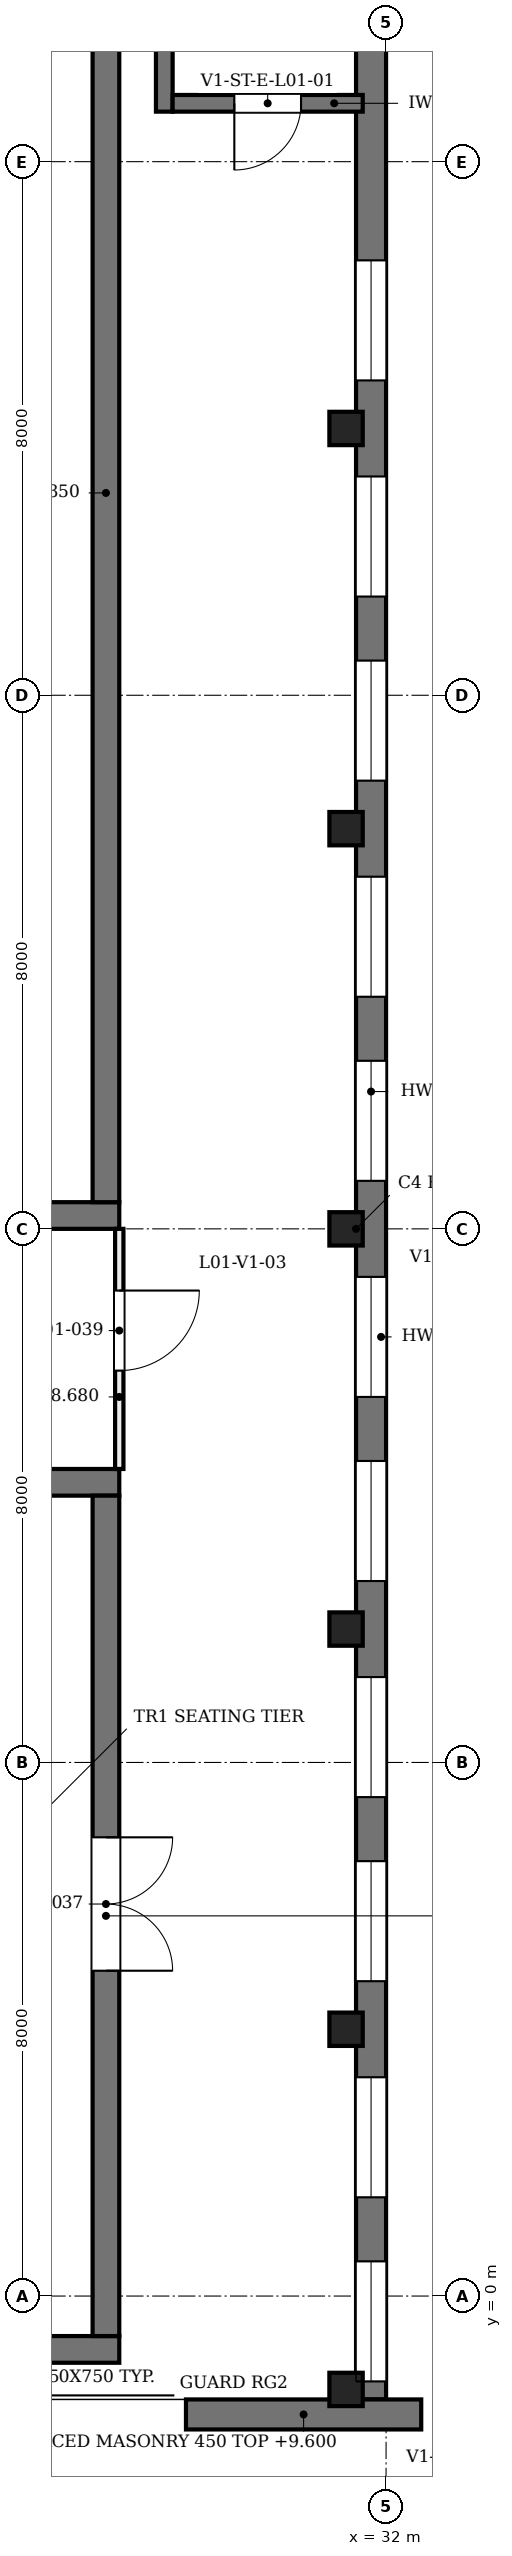
"""IFC4 building model, lengths in metres.
Left out: names, types, materials, properties, quantities, classifications, styles, units other than length and angle.
Written with IfcOpenShell. Run it as: python <this file> out.ifc"""

import sys

from ifc_helpers import new_model, si_unit, direction, frame, frame_2d, origin, origin_2d, place, context, subcontext, project, spatial, rectangle, hollow_rectangle, extrude, element, fill, save


model = new_model("IFC4")
c1 = context("Model", 3, precision=1e-05, world=origin(), true_north=direction((0.0, 1.0)))
c2 = subcontext(c1, "Body", "Model", "MODEL_VIEW")
j1 = project(units=[si_unit("LENGTHUNIT", "METRE"), si_unit("PLANEANGLEUNIT", "RADIAN")], contexts=[c1])
p1 = place(None, origin())
s1 = spatial("IfcSite", under=j1, at=p1, CompositionType="ELEMENT")
p2 = place(p1, origin())
s2 = spatial("IfcBuilding", under=s1, at=p2, CompositionType="ELEMENT")
p3 = place(p2, frame((0.0, 0.0, 4.8)))
s3 = spatial("IfcBuildingStorey", under=s2, at=p3, CompositionType="ELEMENT", Elevation=4.8)
p4 = place(p3, frame((4.0, 16.2, 0.0), z_axis=(0.0, 0.0, 1.0), x_axis=(1.0, 0.0, 0.0)))
e1 = element("IfcWall", 1, at=p4, inside=s3, PredefinedType="SHEAR", context=c2, shape_type="SweptSolid", body=[
    extrude(rectangle(XDim=24.0, YDim=0.4, at=frame_2d((12.0, 0.0))), origin(), (0.0, 0.0, 1.0), 4.55),
])
p5 = place(p3, frame((27.8, 16.4, 0.0), z_axis=(0.0, 0.0, 1.0), x_axis=(0.0, 1.0, 0.0)))
e2 = element("IfcWall", 2, at=p5, inside=s3, PredefinedType="SHEAR", context=c2, shape_type="SweptSolid", body=[
    extrude(rectangle(XDim=22.6, YDim=0.4, at=frame_2d((11.3, 0.0))), origin(), (0.0, 0.0, 1.0), 4.55),
])
for number, where, z_axis, x_axis in (
    (3, (4.0, -0.8, 0.0), (0.0, 0.0, 1.0), (1.0, 0.0, 0.0)),
    (4, (4.0, 12.2, 0.0), (0.0, 0.0, 1.0), (1.0, 0.0, 0.0)),
):
    element("IfcWall", number, at=place(p3, frame(where, z_axis=z_axis, x_axis=x_axis)), inside=s3, PredefinedType="SHEAR", context=c2, shape_type="SweptSolid", body=[
        extrude(rectangle(XDim=24.0, YDim=0.4, at=frame_2d((12.0, 0.0))), origin(), (0.0, 0.0, 1.0), 4.55),
    ])
p6 = place(p3, frame((27.8, -0.6, 0.0), z_axis=(0.0, 0.0, 1.0), x_axis=(0.0, 1.0, 0.0)))
e5 = element("IfcWall", 5, at=p6, inside=s3, PredefinedType="SHEAR", context=c2, shape_type="SweptSolid", body=[
    extrude(rectangle(XDim=12.6, YDim=0.4, at=frame_2d((6.3, 0.0))), origin(), (0.0, 0.0, 1.0), 4.55),
])
p7 = place(p6, frame((5.478, 0.0, 0.0)))
e6 = element("IfcOpeningElement", 6, at=p7, cuts=e5, PredefinedType="OPENING", context=c2, shape_type="SweptSolid", body=[
    extrude(rectangle(XDim=2.0, YDim=2.1, at=frame_2d((1.0, 1.05))), frame((0.0, 0.21, 0.0), z_axis=(0.0, -1.0, 0.0), x_axis=(1.0, 0.0, 0.0)), (0.0, 0.0, 1.0), 0.42),
])
for number, where, z_axis, x_axis in (
    (7, (31.4, -1.4, 0.0), (0.0, 0.0, 1.0), (1.0, 0.0, 0.0)),
    (8, (31.4, 4.0, 0.0), (0.0, 0.0, 1.0), (1.0, 0.0, 0.0)),
    (9, (31.4, 10.0, 0.0), (0.0, 0.0, 1.0), (1.0, 0.0, 0.0)),
    (10, (31.4, 16.0, 0.0), (0.0, 0.0, 1.0), (1.0, 0.0, 0.0)),
    (11, (31.4, 22.0, 0.0), (0.0, 0.0, 1.0), (1.0, 0.0, 0.0)),
    (12, (31.4, 28.0, 0.0), (0.0, 0.0, 1.0), (1.0, 0.0, 0.0)),
):
    element("IfcColumn", number, at=place(p3, frame(where, z_axis=z_axis, x_axis=x_axis)), inside=s3, PredefinedType="COLUMN", context=c2, shape_type="SweptSolid", body=[
        extrude(rectangle(XDim=0.5, YDim=0.5, at=origin_2d()), origin(), (0.0, 0.0, 1.0), 4.8),
    ])
p8 = place(p3, frame((33.213, -2.0, 0.0), z_axis=(-0.100951540179, 0.0, 0.994891344085), x_axis=(0.0, -1.0, 0.0)))
e13 = element("IfcColumn", 13, at=p8, inside=s3, PredefinedType="COLUMN", context=c2, shape_type="SweptSolid", body=[
    extrude(hollow_rectangle(XDim=0.4, YDim=0.4, WallThickness=0.016, InnerFilletRadius=0.016, OuterFilletRadius=0.024, at=origin_2d()), origin(), (0.0, 0.0, 1.0), 4.825),
])
for number, where, z_axis, x_axis in (
    (14, (33.213, 4.0, 0.0), (-0.101, 0.0, 0.995), (0.0, -1.0, 0.0)),
    (15, (33.213, 10.0, 0.0), (-0.101, 0.0, 0.995), (0.0, -1.0, 0.0)),
    (16, (33.213, 16.0, 0.0), (-0.101, 0.0, 0.995), (0.0, -1.0, 0.0)),
    (17, (33.213, 22.0, 0.0), (-0.101, 0.0, 0.995), (0.0, -1.0, 0.0)),
    (18, (33.213, 28.0, 0.0), (-0.101, 0.0, 0.995), (0.0, -1.0, 0.0)),
):
    element("IfcColumn", number, at=place(p3, frame(where, z_axis=z_axis, x_axis=x_axis)), inside=s3, PredefinedType="COLUMN", context=c2, shape_type="SweptSolid", body=[
        extrude(hollow_rectangle(XDim=0.4, YDim=0.4, WallThickness=0.012, InnerFilletRadius=0.012, OuterFilletRadius=0.019, at=origin_2d()), origin(), (0.0, 0.0, 1.0), 4.825),
    ])
p9 = place(p3, frame((31.775, -1.55, 0.0), z_axis=(0.0, 0.0, 1.0), x_axis=(0.0, 1.0, 0.0)))
e19 = element("IfcWall", 19, at=p9, inside=s3, PredefinedType="SOLIDWALL", context=c2, shape_type="SweptSolid", body=[
    extrude(rectangle(XDim=41.1, YDim=0.45, at=frame_2d((20.55, 0.0))), origin(), (0.0, 0.0, 1.0), 4.8),
])
p10 = place(p9, frame((0.27, 0.0, 0.6)))
e20 = element("IfcOpeningElement", 20, at=p10, cuts=e19, PredefinedType="OPENING", context=c2, shape_type="SweptSolid", body=[
    extrude(rectangle(XDim=1.8, YDim=3.6, at=frame_2d((0.9, 1.8))), frame((0.0, 0.235, 0.0), z_axis=(0.0, -1.0, 0.0), x_axis=(1.0, 0.0, 0.0)), (0.0, 0.0, 1.0), 0.47),
])
p11 = place(p9, frame((3.03, 0.0, 0.6)))
e21 = element("IfcOpeningElement", 21, at=p11, cuts=e19, PredefinedType="OPENING", context=c2, shape_type="SweptSolid", body=[
    extrude(rectangle(XDim=1.8, YDim=3.6, at=frame_2d((0.9, 1.8))), frame((0.0, 0.235, 0.0), z_axis=(0.0, -1.0, 0.0), x_axis=(1.0, 0.0, 0.0)), (0.0, 0.0, 1.0), 0.47),
])
p12 = place(p9, frame((6.27, 0.0, 0.6)))
e22 = element("IfcOpeningElement", 22, at=p12, cuts=e19, PredefinedType="OPENING", context=c2, shape_type="SweptSolid", body=[
    extrude(rectangle(XDim=1.8, YDim=3.6, at=frame_2d((0.9, 1.8))), frame((0.0, 0.235, 0.0), z_axis=(0.0, -1.0, 0.0), x_axis=(1.0, 0.0, 0.0)), (0.0, 0.0, 1.0), 0.47),
])
p13 = place(p9, frame((9.03, 0.0, 0.6)))
e23 = element("IfcOpeningElement", 23, at=p13, cuts=e19, PredefinedType="OPENING", context=c2, shape_type="SweptSolid", body=[
    extrude(rectangle(XDim=1.8, YDim=3.6, at=frame_2d((0.9, 1.8))), frame((0.0, 0.235, 0.0), z_axis=(0.0, -1.0, 0.0), x_axis=(1.0, 0.0, 0.0)), (0.0, 0.0, 1.0), 0.47),
])
p14 = place(p9, frame((12.27, 0.0, 0.6)))
e24 = element("IfcOpeningElement", 24, at=p14, cuts=e19, PredefinedType="OPENING", context=c2, shape_type="SweptSolid", body=[
    extrude(rectangle(XDim=1.8, YDim=3.6, at=frame_2d((0.9, 1.8))), frame((0.0, 0.235, 0.0), z_axis=(0.0, -1.0, 0.0), x_axis=(1.0, 0.0, 0.0)), (0.0, 0.0, 1.0), 0.47),
])
p15 = place(p9, frame((15.03, 0.0, 0.6)))
e25 = element("IfcOpeningElement", 25, at=p15, cuts=e19, PredefinedType="OPENING", context=c2, shape_type="SweptSolid", body=[
    extrude(rectangle(XDim=1.8, YDim=3.6, at=frame_2d((0.9, 1.8))), frame((0.0, 0.235, 0.0), z_axis=(0.0, -1.0, 0.0), x_axis=(1.0, 0.0, 0.0)), (0.0, 0.0, 1.0), 0.47),
])
p16 = place(p9, frame((18.27, 0.0, 0.6)))
e26 = element("IfcOpeningElement", 26, at=p16, cuts=e19, PredefinedType="OPENING", context=c2, shape_type="SweptSolid", body=[
    extrude(rectangle(XDim=1.8, YDim=3.6, at=frame_2d((0.9, 1.8))), frame((0.0, 0.235, 0.0), z_axis=(0.0, -1.0, 0.0), x_axis=(1.0, 0.0, 0.0)), (0.0, 0.0, 1.0), 0.47),
])
p17 = place(p9, frame((21.03, 0.0, 0.6)))
e27 = element("IfcOpeningElement", 27, at=p17, cuts=e19, PredefinedType="OPENING", context=c2, shape_type="SweptSolid", body=[
    extrude(rectangle(XDim=1.8, YDim=3.6, at=frame_2d((0.9, 1.8))), frame((0.0, 0.235, 0.0), z_axis=(0.0, -1.0, 0.0), x_axis=(1.0, 0.0, 0.0)), (0.0, 0.0, 1.0), 0.47),
])
p18 = place(p9, frame((24.27, 0.0, 0.6)))
e28 = element("IfcOpeningElement", 28, at=p18, cuts=e19, PredefinedType="OPENING", context=c2, shape_type="SweptSolid", body=[
    extrude(rectangle(XDim=1.8, YDim=3.6, at=frame_2d((0.9, 1.8))), frame((0.0, 0.235, 0.0), z_axis=(0.0, -1.0, 0.0), x_axis=(1.0, 0.0, 0.0)), (0.0, 0.0, 1.0), 0.47),
])
p19 = place(p9, frame((27.03, 0.0, 0.6)))
e29 = element("IfcOpeningElement", 29, at=p19, cuts=e19, PredefinedType="OPENING", context=c2, shape_type="SweptSolid", body=[
    extrude(rectangle(XDim=1.8, YDim=3.6, at=frame_2d((0.9, 1.8))), frame((0.0, 0.235, 0.0), z_axis=(0.0, -1.0, 0.0), x_axis=(1.0, 0.0, 0.0)), (0.0, 0.0, 1.0), 0.47),
])
p20 = place(p9, frame((30.27, 0.0, 0.6)))
e30 = element("IfcOpeningElement", 30, at=p20, cuts=e19, PredefinedType="OPENING", context=c2, shape_type="SweptSolid", body=[
    extrude(rectangle(XDim=1.8, YDim=3.6, at=frame_2d((0.9, 1.8))), frame((0.0, 0.235, 0.0), z_axis=(0.0, -1.0, 0.0), x_axis=(1.0, 0.0, 0.0)), (0.0, 0.0, 1.0), 0.47),
])
p21 = place(p3, frame((29.0, -1.775, 0.0), z_axis=(0.0, 0.0, 1.0), x_axis=(1.0, 0.0, 0.0)))
e31 = element("IfcWall", 31, at=p21, inside=s3, PredefinedType="SOLIDWALL", context=c2, shape_type="SweptSolid", body=[
    extrude(rectangle(XDim=3.527, YDim=0.45, at=frame_2d((1.764, 0.0))), origin(), (0.0, 0.0, 1.0), 4.8),
])
p22 = place(p3, frame((28.675, 32.75, 0.0), z_axis=(0.0, 0.0, 1.0), x_axis=(0.0, 1.0, 0.0)))
e32 = element("IfcWall", 32, at=p22, inside=s3, PredefinedType="SOLIDWALL", context=c2, shape_type="SweptSolid", body=[
    extrude(rectangle(XDim=6.8, YDim=0.25, at=frame_2d((3.4, 0.0))), origin(), (0.0, 0.0, 1.0), 4.8),
])
p23 = place(p3, frame((28.8, 32.875, 0.0), z_axis=(0.0, 0.0, 1.0), x_axis=(1.0, 0.0, 0.0)))
e33 = element("IfcWall", 33, at=p23, inside=s3, PredefinedType="SOLIDWALL", context=c2, shape_type="SweptSolid", body=[
    extrude(rectangle(XDim=2.85, YDim=0.25, at=frame_2d((1.425, 0.0))), origin(), (0.0, 0.0, 1.0), 4.8),
])
p24 = place(p23, frame((0.925, 0.0, 0.0)))
e34 = element("IfcOpeningElement", 34, at=p24, cuts=e33, PredefinedType="OPENING", context=c2, shape_type="SweptSolid", body=[
    extrude(rectangle(XDim=1.0, YDim=2.1, at=frame_2d((0.5, 1.05))), frame((0.0, 0.135, 0.0), z_axis=(0.0, -1.0, 0.0), x_axis=(1.0, 0.0, 0.0)), (0.0, 0.0, 1.0), 0.27),
])
p25 = place(p3, frame((28.0, 12.4, 0.0), z_axis=(0.0, 0.0, 1.0), x_axis=(0.0, 1.0, 0.0)))
e35 = element("IfcWall", 35, at=p25, inside=s3, PredefinedType="PARTITIONING", context=c2, shape_type="SweptSolid", body=[
    extrude(rectangle(XDim=3.6, YDim=0.125, at=frame_2d((1.8, 0.0))), origin(), (0.0, 0.0, 1.0), 3.88),
])
p26 = place(p25, frame((1.475, 0.0, 0.0)))
e36 = element("IfcOpeningElement", 36, at=p26, cuts=e35, PredefinedType="OPENING", context=c2, shape_type="SweptSolid", body=[
    extrude(rectangle(XDim=1.2, YDim=2.2, at=frame_2d((0.6, 1.1))), frame((0.0, 0.073, 0.0), z_axis=(0.0, -1.0, 0.0), x_axis=(1.0, 0.0, 0.0)), (0.0, 0.0, 1.0), 0.145),
])
p27 = place(p10, origin())
e37 = element("IfcWindow", 37, at=p27, inside=s3, PartitioningType="SINGLE_PANEL", PredefinedType="WINDOW", context=c2, shape_type="SweptSolid", body=[
    extrude(rectangle(XDim=1.8, YDim=3.6, at=frame_2d((0.9, 1.8))), frame((0.0, 0.03, 0.0), z_axis=(0.0, -1.0, 0.0), x_axis=(1.0, 0.0, 0.0)), (0.0, 0.0, 1.0), 0.06),
])
fill(e20, e37)
p28 = place(p11, origin())
e38 = element("IfcWindow", 38, at=p28, inside=s3, PartitioningType="SINGLE_PANEL", PredefinedType="WINDOW", context=c2, shape_type="SweptSolid", body=[
    extrude(rectangle(XDim=1.8, YDim=3.6, at=frame_2d((0.9, 1.8))), frame((0.0, 0.03, 0.0), z_axis=(0.0, -1.0, 0.0), x_axis=(1.0, 0.0, 0.0)), (0.0, 0.0, 1.0), 0.06),
])
fill(e21, e38)
p29 = place(p12, origin())
e39 = element("IfcWindow", 39, at=p29, inside=s3, PartitioningType="SINGLE_PANEL", PredefinedType="WINDOW", context=c2, shape_type="SweptSolid", body=[
    extrude(rectangle(XDim=1.8, YDim=3.6, at=frame_2d((0.9, 1.8))), frame((0.0, 0.03, 0.0), z_axis=(0.0, -1.0, 0.0), x_axis=(1.0, 0.0, 0.0)), (0.0, 0.0, 1.0), 0.06),
])
fill(e22, e39)
p30 = place(p13, origin())
e40 = element("IfcWindow", 40, at=p30, inside=s3, PartitioningType="SINGLE_PANEL", PredefinedType="WINDOW", context=c2, shape_type="SweptSolid", body=[
    extrude(rectangle(XDim=1.8, YDim=3.6, at=frame_2d((0.9, 1.8))), frame((0.0, 0.03, 0.0), z_axis=(0.0, -1.0, 0.0), x_axis=(1.0, 0.0, 0.0)), (0.0, 0.0, 1.0), 0.06),
])
fill(e23, e40)
p31 = place(p14, origin())
e41 = element("IfcWindow", 41, at=p31, inside=s3, PartitioningType="SINGLE_PANEL", PredefinedType="WINDOW", context=c2, shape_type="SweptSolid", body=[
    extrude(rectangle(XDim=1.8, YDim=3.6, at=frame_2d((0.9, 1.8))), frame((0.0, 0.03, 0.0), z_axis=(0.0, -1.0, 0.0), x_axis=(1.0, 0.0, 0.0)), (0.0, 0.0, 1.0), 0.06),
])
fill(e24, e41)
p32 = place(p15, origin())
e42 = element("IfcWindow", 42, at=p32, inside=s3, PartitioningType="SINGLE_PANEL", PredefinedType="WINDOW", context=c2, shape_type="SweptSolid", body=[
    extrude(rectangle(XDim=1.8, YDim=3.6, at=frame_2d((0.9, 1.8))), frame((0.0, 0.03, 0.0), z_axis=(0.0, -1.0, 0.0), x_axis=(1.0, 0.0, 0.0)), (0.0, 0.0, 1.0), 0.06),
])
fill(e25, e42)
p33 = place(p16, origin())
e43 = element("IfcWindow", 43, at=p33, inside=s3, PartitioningType="SINGLE_PANEL", PredefinedType="WINDOW", context=c2, shape_type="SweptSolid", body=[
    extrude(rectangle(XDim=1.8, YDim=3.6, at=frame_2d((0.9, 1.8))), frame((0.0, 0.03, 0.0), z_axis=(0.0, -1.0, 0.0), x_axis=(1.0, 0.0, 0.0)), (0.0, 0.0, 1.0), 0.06),
])
fill(e26, e43)
p34 = place(p17, origin())
e44 = element("IfcWindow", 44, at=p34, inside=s3, PartitioningType="SINGLE_PANEL", PredefinedType="WINDOW", context=c2, shape_type="SweptSolid", body=[
    extrude(rectangle(XDim=1.8, YDim=3.6, at=frame_2d((0.9, 1.8))), frame((0.0, 0.03, 0.0), z_axis=(0.0, -1.0, 0.0), x_axis=(1.0, 0.0, 0.0)), (0.0, 0.0, 1.0), 0.06),
])
fill(e27, e44)
p35 = place(p18, origin())
e45 = element("IfcWindow", 45, at=p35, inside=s3, PartitioningType="SINGLE_PANEL", PredefinedType="WINDOW", context=c2, shape_type="SweptSolid", body=[
    extrude(rectangle(XDim=1.8, YDim=3.6, at=frame_2d((0.9, 1.8))), frame((0.0, 0.03, 0.0), z_axis=(0.0, -1.0, 0.0), x_axis=(1.0, 0.0, 0.0)), (0.0, 0.0, 1.0), 0.06),
])
fill(e28, e45)
p36 = place(p19, origin())
e46 = element("IfcWindow", 46, at=p36, inside=s3, PartitioningType="SINGLE_PANEL", PredefinedType="WINDOW", context=c2, shape_type="SweptSolid", body=[
    extrude(rectangle(XDim=1.8, YDim=3.6, at=frame_2d((0.9, 1.8))), frame((0.0, 0.03, 0.0), z_axis=(0.0, -1.0, 0.0), x_axis=(1.0, 0.0, 0.0)), (0.0, 0.0, 1.0), 0.06),
])
fill(e29, e46)
p37 = place(p20, origin())
e47 = element("IfcWindow", 47, at=p37, inside=s3, PartitioningType="SINGLE_PANEL", PredefinedType="WINDOW", context=c2, shape_type="SweptSolid", body=[
    extrude(rectangle(XDim=1.8, YDim=3.6, at=frame_2d((0.9, 1.8))), frame((0.0, 0.03, 0.0), z_axis=(0.0, -1.0, 0.0), x_axis=(1.0, 0.0, 0.0)), (0.0, 0.0, 1.0), 0.06),
])
fill(e30, e47)
p38 = place(p24, frame((1.0, 0.0, 0.0), z_axis=(0.0, 0.0, 1.0), x_axis=(-1.0, 0.0, 0.0)))
e48 = element("IfcDoor", 48, at=p38, inside=s3, OperationType="SINGLE_SWING_LEFT", PredefinedType="DOOR", context=c2, shape_type="SweptSolid", body=[
    extrude(rectangle(XDim=1.0, YDim=2.1, at=frame_2d((0.5, 1.05))), frame((0.0, 0.025, 0.0), z_axis=(0.0, -1.0, 0.0), x_axis=(1.0, 0.0, 0.0)), (0.0, 0.0, 1.0), 0.05),
])
fill(e34, e48)
p39 = place(p7, frame((2.0, 0.0, 0.0), z_axis=(0.0, 0.0, 1.0), x_axis=(-1.0, 0.0, 0.0)))
e49 = element("IfcDoor", 49, at=p39, inside=s3, OperationType="DOUBLE_DOOR_SINGLE_SWING", PredefinedType="DOOR", context=c2, shape_type="SweptSolid", body=[
    extrude(rectangle(XDim=2.0, YDim=2.1, at=frame_2d((1.0, 1.05))), frame((0.0, 0.025, 0.0), z_axis=(0.0, -1.0, 0.0), x_axis=(1.0, 0.0, 0.0)), (0.0, 0.0, 1.0), 0.05),
])
fill(e6, e49)
p40 = place(p26, origin())
e50 = element("IfcDoor", 50, at=p40, inside=s3, OperationType="SINGLE_SWING_RIGHT", PredefinedType="DOOR", context=c2, shape_type="SweptSolid", body=[
    extrude(rectangle(XDim=1.2, YDim=2.2, at=frame_2d((0.6, 1.1))), frame((0.0, 0.025, 0.0), z_axis=(0.0, -1.0, 0.0), x_axis=(1.0, 0.0, 0.0)), (0.0, 0.0, 1.0), 0.05),
])
fill(e36, e50)
save(model, sys.argv[1])
